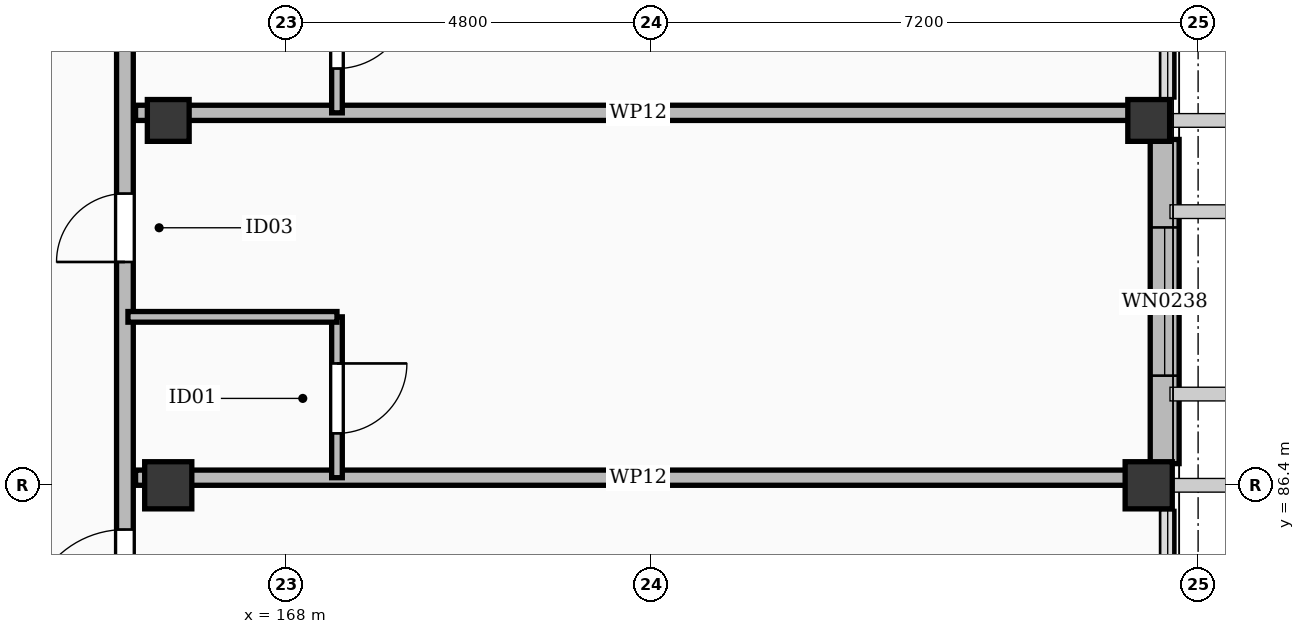
"""IFC4 building model, lengths in metres.
Left out: names, types, materials, properties, quantities, classifications, styles, units other than length and angle.
Written with IfcOpenShell. Run it as: python <this file> out.ifc"""

import sys

from ifc_helpers import new_model, si_unit, direction, frame, frame_2d, origin, origin_2d, place, context, subcontext, project, spatial, rectangle, extrude, element, fill, save


model = new_model("IFC4")
c1 = context("Model", 3, precision=1e-05, world=origin(), true_north=direction((0.0, 1.0)))
c2 = subcontext(c1, "Body", "Model", "MODEL_VIEW")
j1 = project(units=[si_unit("LENGTHUNIT", "METRE"), si_unit("PLANEANGLEUNIT", "RADIAN")], contexts=[c1])
p1 = place(None, origin())
s1 = spatial("IfcSite", under=j1, at=p1, CompositionType="ELEMENT")
p2 = place(p1, origin())
s2 = spatial("IfcBuilding", under=s1, at=p2, CompositionType="ELEMENT")
p3 = place(p2, frame((0.0, 0.0, 42.6)))
s3 = spatial("IfcBuildingStorey", under=s2, at=p3, CompositionType="ELEMENT", Elevation=42.6)
for number, where, z_axis, x_axis in (
    (1, (166.45, 86.4, 0.0), (0.0, 0.0, 1.0), (1.0, 0.0, 0.0)),
    (2, (179.35, 86.4, 0.0), (0.0, 0.0, 1.0), (1.0, 0.0, 0.0)),
):
    element("IfcColumn", number, at=place(p3, frame(where, z_axis=z_axis, x_axis=x_axis)), inside=s3, PredefinedType="COLUMN", context=c2, shape_type="SweptSolid", body=[
        extrude(rectangle(XDim=0.62, YDim=0.62, at=origin_2d()), origin(), (0.0, 0.0, 1.0), 3.9),
    ])
for number, where, z_axis, x_axis in (
    (3, (166.45, 91.2, 0.0), (0.0, 0.0, 1.0), (1.0, 0.0, 0.0)),
    (4, (179.35, 91.2, 0.0), (0.0, 0.0, 1.0), (1.0, 0.0, 0.0)),
):
    element("IfcColumn", number, at=place(p3, frame(where, z_axis=z_axis, x_axis=x_axis)), inside=s3, PredefinedType="COLUMN", context=c2, shape_type="SweptSolid", body=[
        extrude(rectangle(XDim=0.55, YDim=0.55, at=origin_2d()), origin(), (0.0, 0.0, 1.0), 3.9),
    ])
p4 = place(p3, frame((179.56, 90.95, 0.0), z_axis=(0.0, 0.0, 1.0), x_axis=(0.0, -1.0, 0.0)))
e5 = element("IfcWall", 5, at=p4, inside=s3, PredefinedType="SOLIDWALL", context=c2, shape_type="SweptSolid", body=[
    extrude(rectangle(XDim=4.265, YDim=0.38, at=frame_2d((2.132, 0.0))), origin(), (0.0, 0.0, 1.0), 2.902),
])
p5 = place(p4, frame((1.157, 0.0, 0.55)))
e6 = element("IfcOpeningElement", 6, at=p5, cuts=e5, PredefinedType="OPENING", context=c2, shape_type="SweptSolid", body=[
    extrude(rectangle(XDim=1.95, YDim=1.77, at=frame_2d((0.975, 0.885))), frame((0.0, 0.202, 0.0), z_axis=(0.0, -1.0, 0.0), x_axis=(1.0, 0.0, 0.0)), (0.0, 0.0, 1.0), 0.404),
])
p6 = place(p3, frame((165.88, 62.75, 0.0), z_axis=(0.0, 0.0, 1.0), x_axis=(0.0, 1.0, 0.0)))
e7 = element("IfcWall", 7, at=p6, inside=s3, PredefinedType="PARTITIONING", context=c2, shape_type="SweptSolid", body=[
    extrude(rectangle(XDim=62.9, YDim=0.22, at=frame_2d((31.45, 0.0))), origin(), (0.0, 0.0, 1.0), 2.902),
])
p7 = place(p6, frame((0.691, 0.0, 0.0)))
e8 = element("IfcOpeningElement", 8, at=p7, cuts=e7, PredefinedType="OPENING", context=c2, shape_type="SweptSolid", body=[
    extrude(rectangle(XDim=1.05, YDim=2.22, at=frame_2d((0.525, 1.11))), frame((0.0, 0.122, 0.0), z_axis=(0.0, -1.0, 0.0), x_axis=(1.0, 0.0, 0.0)), (0.0, 0.0, 1.0), 0.244),
])
p8 = place(p6, frame((7.388, 0.0, 0.0)))
e9 = element("IfcOpeningElement", 9, at=p8, cuts=e7, PredefinedType="OPENING", context=c2, shape_type="SweptSolid", body=[
    extrude(rectangle(XDim=1.02, YDim=2.2, at=frame_2d((0.51, 1.1))), frame((0.0, 0.122, 0.0), z_axis=(0.0, -1.0, 0.0), x_axis=(1.0, 0.0, 0.0)), (0.0, 0.0, 1.0), 0.244),
])
p9 = place(p6, frame((12.188, 0.0, 0.0)))
e10 = element("IfcOpeningElement", 10, at=p9, cuts=e7, PredefinedType="OPENING", context=c2, shape_type="SweptSolid", body=[
    extrude(rectangle(XDim=1.14, YDim=2.26, at=frame_2d((0.57, 1.13))), frame((0.0, 0.122, 0.0), z_axis=(0.0, -1.0, 0.0), x_axis=(1.0, 0.0, 0.0)), (0.0, 0.0, 1.0), 0.244),
])
p10 = place(p6, frame((16.988, 0.0, 0.0)))
e11 = element("IfcOpeningElement", 11, at=p10, cuts=e7, PredefinedType="OPENING", context=c2, shape_type="SweptSolid", body=[
    extrude(rectangle(XDim=0.98, YDim=2.15, at=frame_2d((0.49, 1.075))), frame((0.0, 0.122, 0.0), z_axis=(0.0, -1.0, 0.0), x_axis=(1.0, 0.0, 0.0)), (0.0, 0.0, 1.0), 0.244),
])
p11 = place(p6, frame((21.788, 0.0, 0.0)))
e12 = element("IfcOpeningElement", 12, at=p11, cuts=e7, PredefinedType="OPENING", context=c2, shape_type="SweptSolid", body=[
    extrude(rectangle(XDim=1.28, YDim=2.16, at=frame_2d((0.64, 1.08))), frame((0.0, 0.122, 0.0), z_axis=(0.0, -1.0, 0.0), x_axis=(1.0, 0.0, 0.0)), (0.0, 0.0, 1.0), 0.244),
])
p12 = place(p6, frame((26.588, 0.0, 0.0)))
e13 = element("IfcOpeningElement", 13, at=p12, cuts=e7, PredefinedType="OPENING", context=c2, shape_type="SweptSolid", body=[
    extrude(rectangle(XDim=0.9, YDim=2.08, at=frame_2d((0.45, 1.04))), frame((0.0, 0.122, 0.0), z_axis=(0.0, -1.0, 0.0), x_axis=(1.0, 0.0, 0.0)), (0.0, 0.0, 1.0), 0.244),
])
p13 = place(p6, frame((31.388, 0.0, 0.0)))
e14 = element("IfcOpeningElement", 14, at=p13, cuts=e7, PredefinedType="OPENING", context=c2, shape_type="SweptSolid", body=[
    extrude(rectangle(XDim=1.05, YDim=2.22, at=frame_2d((0.525, 1.11))), frame((0.0, 0.122, 0.0), z_axis=(0.0, -1.0, 0.0), x_axis=(1.0, 0.0, 0.0)), (0.0, 0.0, 1.0), 0.244),
])
p14 = place(p6, frame((36.188, 0.0, 0.0)))
e15 = element("IfcOpeningElement", 15, at=p14, cuts=e7, PredefinedType="OPENING", context=c2, shape_type="SweptSolid", body=[
    extrude(rectangle(XDim=1.02, YDim=2.2, at=frame_2d((0.51, 1.1))), frame((0.0, 0.122, 0.0), z_axis=(0.0, -1.0, 0.0), x_axis=(1.0, 0.0, 0.0)), (0.0, 0.0, 1.0), 0.244),
])
p15 = place(p6, frame((40.988, 0.0, 0.0)))
e16 = element("IfcOpeningElement", 16, at=p15, cuts=e7, PredefinedType="OPENING", context=c2, shape_type="SweptSolid", body=[
    extrude(rectangle(XDim=1.14, YDim=2.26, at=frame_2d((0.57, 1.13))), frame((0.0, 0.122, 0.0), z_axis=(0.0, -1.0, 0.0), x_axis=(1.0, 0.0, 0.0)), (0.0, 0.0, 1.0), 0.244),
])
p16 = place(p6, frame((45.788, 0.0, 0.0)))
e17 = element("IfcOpeningElement", 17, at=p16, cuts=e7, PredefinedType="OPENING", context=c2, shape_type="SweptSolid", body=[
    extrude(rectangle(XDim=0.98, YDim=2.15, at=frame_2d((0.49, 1.075))), frame((0.0, 0.122, 0.0), z_axis=(0.0, -1.0, 0.0), x_axis=(1.0, 0.0, 0.0)), (0.0, 0.0, 1.0), 0.244),
])
p17 = place(p6, frame((50.588, 0.0, 0.0)))
e18 = element("IfcOpeningElement", 18, at=p17, cuts=e7, PredefinedType="OPENING", context=c2, shape_type="SweptSolid", body=[
    extrude(rectangle(XDim=1.28, YDim=2.16, at=frame_2d((0.64, 1.08))), frame((0.0, 0.122, 0.0), z_axis=(0.0, -1.0, 0.0), x_axis=(1.0, 0.0, 0.0)), (0.0, 0.0, 1.0), 0.244),
])
p18 = place(p6, frame((55.388, 0.0, 0.0)))
e19 = element("IfcOpeningElement", 19, at=p18, cuts=e7, PredefinedType="OPENING", context=c2, shape_type="SweptSolid", body=[
    extrude(rectangle(XDim=0.9, YDim=2.08, at=frame_2d((0.45, 1.04))), frame((0.0, 0.122, 0.0), z_axis=(0.0, -1.0, 0.0), x_axis=(1.0, 0.0, 0.0)), (0.0, 0.0, 1.0), 0.244),
])
p19 = place(p6, frame((60.188, 0.0, 0.0)))
e20 = element("IfcOpeningElement", 20, at=p19, cuts=e7, PredefinedType="OPENING", context=c2, shape_type="SweptSolid", body=[
    extrude(rectangle(XDim=1.05, YDim=2.22, at=frame_2d((0.525, 1.11))), frame((0.0, 0.122, 0.0), z_axis=(0.0, -1.0, 0.0), x_axis=(1.0, 0.0, 0.0)), (0.0, 0.0, 1.0), 0.244),
])
p20 = place(p3, frame((166.02, 86.5, 0.0), z_axis=(0.0, 0.0, 1.0), x_axis=(1.0, 0.0, 0.0)))
e21 = element("IfcWall", 21, at=p20, inside=s3, PredefinedType="PARTITIONING", context=c2, shape_type="SweptSolid", body=[
    extrude(rectangle(XDim=13.23, YDim=0.2, at=frame_2d((6.615, 0.0))), origin(), (0.0, 0.0, 1.0), 2.902),
])
p21 = place(p3, frame((168.67, 86.5, 0.0), z_axis=(0.0, 0.0, 1.0), x_axis=(0.0, 1.0, 0.0)))
e22 = element("IfcWall", 22, at=p21, inside=s3, PredefinedType="PARTITIONING", context=c2, shape_type="SweptSolid", body=[
    extrude(rectangle(XDim=2.116, YDim=0.14, at=frame_2d((1.058, 0.0))), origin(), (0.0, 0.0, 1.0), 3.072),
])
p22 = place(p21, frame((0.583, 0.0, 0.0)))
e23 = element("IfcOpeningElement", 23, at=p22, cuts=e22, PredefinedType="OPENING", context=c2, shape_type="SweptSolid", body=[
    extrude(rectangle(XDim=0.92, YDim=2.1, at=frame_2d((0.46, 1.05))), frame((0.0, 0.082, 0.0), z_axis=(0.0, -1.0, 0.0), x_axis=(1.0, 0.0, 0.0)), (0.0, 0.0, 1.0), 0.164),
])
p23 = place(p3, frame((165.92, 88.616, 0.0), z_axis=(0.0, 0.0, 1.0), x_axis=(1.0, 0.0, 0.0)))
e24 = element("IfcWall", 24, at=p23, inside=s3, PredefinedType="PARTITIONING", context=c2, shape_type="SweptSolid", body=[
    extrude(rectangle(XDim=2.75, YDim=0.14, at=frame_2d((1.375, 0.0))), origin(), (0.0, 0.0, 1.0), 3.072),
])
p24 = place(p3, frame((166.02, 91.3, 0.0), z_axis=(0.0, 0.0, 1.0), x_axis=(1.0, 0.0, 0.0)))
e25 = element("IfcWall", 25, at=p24, inside=s3, PredefinedType="PARTITIONING", context=c2, shape_type="SweptSolid", body=[
    extrude(rectangle(XDim=13.23, YDim=0.2, at=frame_2d((6.615, 0.0))), origin(), (0.0, 0.0, 1.0), 2.902),
])
p25 = place(p3, frame((168.67, 91.3, 0.0), z_axis=(0.0, 0.0, 1.0), x_axis=(0.0, 1.0, 0.0)))
e26 = element("IfcWall", 26, at=p25, inside=s3, PredefinedType="PARTITIONING", context=c2, shape_type="SweptSolid", body=[
    extrude(rectangle(XDim=2.116, YDim=0.14, at=frame_2d((1.058, 0.0))), origin(), (0.0, 0.0, 1.0), 3.072),
])
p26 = place(p25, frame((0.583, 0.0, 0.0)))
e27 = element("IfcOpeningElement", 27, at=p26, cuts=e26, PredefinedType="OPENING", context=c2, shape_type="SweptSolid", body=[
    extrude(rectangle(XDim=0.96, YDim=2.12, at=frame_2d((0.48, 1.06))), frame((0.0, 0.082, 0.0), z_axis=(0.0, -1.0, 0.0), x_axis=(1.0, 0.0, 0.0)), (0.0, 0.0, 1.0), 0.164),
])
p27 = place(p5, origin())
e28 = element("IfcWindow", 28, at=p27, inside=s3, PartitioningType="SINGLE_PANEL", PredefinedType="WINDOW", context=c2, shape_type="SweptSolid", body=[
    extrude(rectangle(XDim=1.95, YDim=1.77, at=frame_2d((0.975, 0.885))), frame((0.0, 0.03, 0.0), z_axis=(0.0, -1.0, 0.0), x_axis=(1.0, 0.0, 0.0)), (0.0, 0.0, 1.0), 0.06),
])
fill(e6, e28)
p28 = place(p11, origin())
e29 = element("IfcDoor", 29, at=p28, inside=s3, OperationType="SINGLE_SWING_LEFT", PredefinedType="DOOR", context=c2, shape_type="SweptSolid", body=[
    extrude(rectangle(XDim=1.28, YDim=2.16, at=frame_2d((0.64, 1.08))), frame((0.0, 0.025, 0.0), z_axis=(0.0, -1.0, 0.0), x_axis=(1.0, 0.0, 0.0)), (0.0, 0.0, 1.0), 0.05),
])
fill(e12, e29)
p29 = place(p12, origin())
e30 = element("IfcDoor", 30, at=p29, inside=s3, OperationType="SINGLE_SWING_LEFT", PredefinedType="DOOR", context=c2, shape_type="SweptSolid", body=[
    extrude(rectangle(XDim=0.9, YDim=2.08, at=frame_2d((0.45, 1.04))), frame((0.0, 0.025, 0.0), z_axis=(0.0, -1.0, 0.0), x_axis=(1.0, 0.0, 0.0)), (0.0, 0.0, 1.0), 0.05),
])
fill(e13, e30)
p30 = place(p22, frame((0.92, 0.0, 0.0), z_axis=(0.0, 0.0, 1.0), x_axis=(-1.0, 0.0, 0.0)))
e31 = element("IfcDoor", 31, at=p30, inside=s3, OperationType="SINGLE_SWING_RIGHT", PredefinedType="DOOR", context=c2, shape_type="SweptSolid", body=[
    extrude(rectangle(XDim=0.92, YDim=2.1, at=frame_2d((0.46, 1.05))), frame((0.0, 0.025, 0.0), z_axis=(0.0, -1.0, 0.0), x_axis=(1.0, 0.0, 0.0)), (0.0, 0.0, 1.0), 0.05),
])
fill(e23, e31)
p31 = place(p26, frame((0.96, 0.0, 0.0), z_axis=(0.0, 0.0, 1.0), x_axis=(-1.0, 0.0, 0.0)))
e32 = element("IfcDoor", 32, at=p31, inside=s3, OperationType="SINGLE_SWING_RIGHT", PredefinedType="DOOR", context=c2, shape_type="SweptSolid", body=[
    extrude(rectangle(XDim=0.96, YDim=2.12, at=frame_2d((0.48, 1.06))), frame((0.0, 0.025, 0.0), z_axis=(0.0, -1.0, 0.0), x_axis=(1.0, 0.0, 0.0)), (0.0, 0.0, 1.0), 0.05),
])
fill(e27, e32)
save(model, sys.argv[1])
